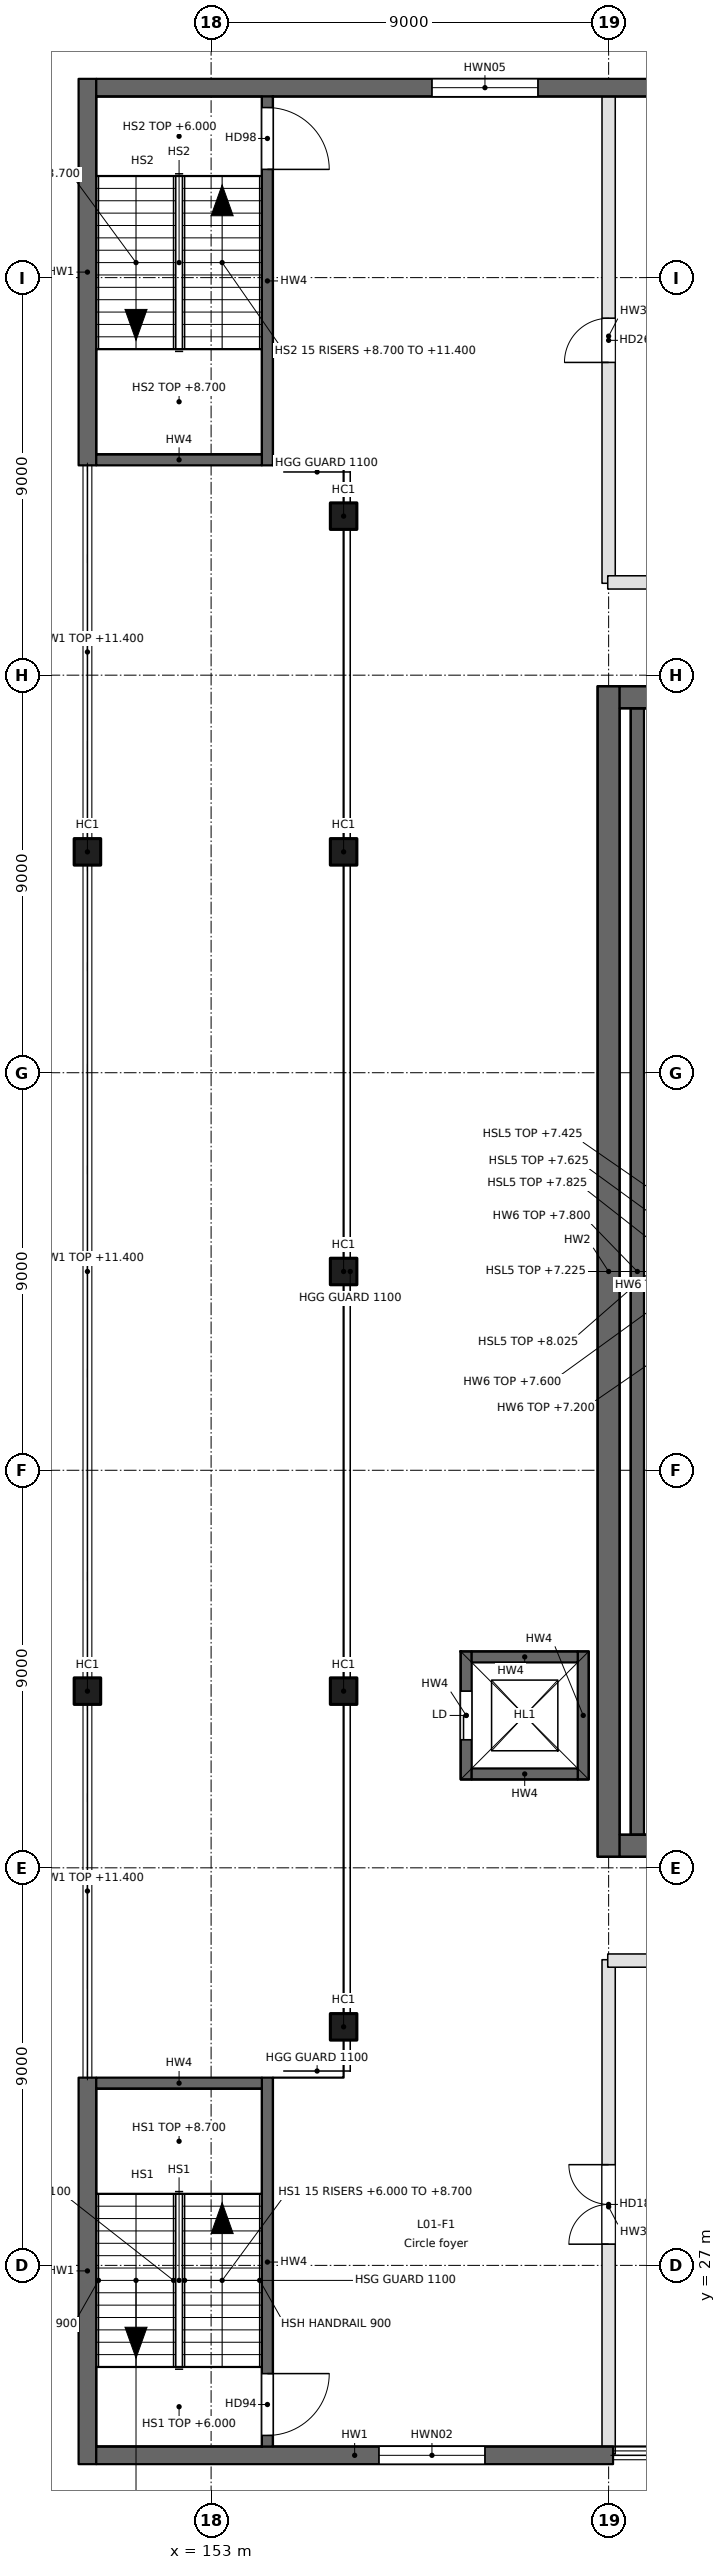
"""IFC4 building model, lengths in metres.
Left out: names, types, materials, properties, quantities, classifications, styles, units other than length and angle.
Written with IfcOpenShell. Run it as: python <this file> out.ifc"""

import sys

from ifc_helpers import new_model, si_unit, direction, frame, frame_2d, origin, origin_2d, place, context, subcontext, project, spatial, rectangle, extrude, element, fill, save


model = new_model("IFC4")
c1 = context("Model", 3, precision=1e-05, world=origin(), true_north=direction((0.0, 1.0)))
c2 = subcontext(c1, "Body", "Model", "MODEL_VIEW")
j1 = project(units=[si_unit("LENGTHUNIT", "METRE"), si_unit("PLANEANGLEUNIT", "RADIAN")], contexts=[c1])
p1 = place(None, origin())
s1 = spatial("IfcSite", under=j1, at=p1, CompositionType="ELEMENT")
p2 = place(p1, origin())
s2 = spatial("IfcBuilding", under=s1, at=p2, CompositionType="ELEMENT")
p3 = place(p2, frame((0.0, 0.0, 6.0)))
s3 = spatial("IfcBuildingStorey", under=s2, at=p3, CompositionType="ELEMENT", Elevation=6.0)
for number, where, z_axis, x_axis in (
    (1, (156.0, 32.4, 0.0), (0.0, 0.0, 1.0), (1.0, 0.0, 0.0)),
    (2, (156.0, 40.0, 0.0), (0.0, 0.0, 1.0), (1.0, 0.0, 0.0)),
    (3, (156.0, 49.5, 0.0), (0.0, 0.0, 1.0), (1.0, 0.0, 0.0)),
    (4, (156.0, 59.0, 0.0), (0.0, 0.0, 1.0), (1.0, 0.0, 0.0)),
    (5, (156.0, 66.6, 0.0), (0.0, 0.0, 1.0), (1.0, 0.0, 0.0)),
    (6, (150.2, 40.0, 0.0), (0.0, 0.0, 1.0), (1.0, 0.0, 0.0)),
    (7, (150.2, 59.0, 0.0), (0.0, 0.0, 1.0), (1.0, 0.0, 0.0)),
):
    element("IfcColumn", number, at=place(p3, frame(where, z_axis=z_axis, x_axis=x_axis)), inside=s3, PredefinedType="COLUMN", context=c2, shape_type="SweptSolid", body=[
        extrude(rectangle(XDim=0.6, YDim=0.6, at=origin_2d()), origin(), (0.0, 0.0, 1.0), 5.4),
    ])
p4 = place(p3, frame((162.0, 36.25, -0.35), z_axis=(0.0, 0.0, 1.0), x_axis=(0.0, 1.0, 0.0)))
e8 = element("IfcWall", 8, at=p4, inside=s3, PredefinedType="SOLIDWALL", context=c2, shape_type="SweptSolid", body=[
    extrude(rectangle(XDim=26.5, YDim=0.5, at=frame_2d((13.25, 0.0))), origin(), (0.0, 0.0, 1.0), 5.4),
])
p5 = place(p3, frame((209.6, 36.5, -0.35), z_axis=(0.0, 0.0, 1.0), x_axis=(-1.0, 0.0, 0.0)))
e9 = element("IfcWall", 9, at=p5, inside=s3, PredefinedType="SOLIDWALL", context=c2, shape_type="SweptSolid", body=[
    extrude(rectangle(XDim=47.35, YDim=0.5, at=frame_2d((23.675, 0.0))), origin(), (0.0, 0.0, 1.0), 5.4),
])
p6 = place(p5, frame((35.7, 0.0, 0.35)))
e10 = element("IfcOpeningElement", 10, at=p6, cuts=e9, PredefinedType="OPENING", context=c2, shape_type="SweptSolid", body=[
    extrude(rectangle(XDim=1.8, YDim=2.4, at=frame_2d((0.9, 1.2))), frame((0.0, 0.25, 0.0), z_axis=(0.0, -1.0, 0.0), x_axis=(1.0, 0.0, 0.0)), (0.0, 0.0, 1.0), 0.5),
])
p7 = place(p5, frame((33.3, 0.0, 0.35)))
e11 = element("IfcOpeningElement", 11, at=p7, cuts=e9, PredefinedType="OPENING", context=c2, shape_type="SweptSolid", body=[
    extrude(rectangle(XDim=1.8, YDim=2.4, at=frame_2d((0.9, 1.2))), frame((0.0, 0.25, 0.0), z_axis=(0.0, -1.0, 0.0), x_axis=(1.0, 0.0, 0.0)), (0.0, 0.0, 1.0), 0.5),
])
p8 = place(p3, frame((162.25, 62.5, -0.35), z_axis=(0.0, 0.0, 1.0), x_axis=(1.0, 0.0, 0.0)))
e12 = element("IfcWall", 12, at=p8, inside=s3, PredefinedType="SOLIDWALL", context=c2, shape_type="SweptSolid", body=[
    extrude(rectangle(XDim=47.35, YDim=0.5, at=frame_2d((23.675, 0.0))), origin(), (0.0, 0.0, 1.0), 5.4),
])
p9 = place(p8, frame((9.85, 0.0, 0.35)))
e13 = element("IfcOpeningElement", 13, at=p9, cuts=e12, PredefinedType="OPENING", context=c2, shape_type="SweptSolid", body=[
    extrude(rectangle(XDim=1.8, YDim=2.4, at=frame_2d((0.9, 1.2))), frame((0.0, 0.25, 0.0), z_axis=(0.0, -1.0, 0.0), x_axis=(1.0, 0.0, 0.0)), (0.0, 0.0, 1.0), 0.5),
])
p10 = place(p8, frame((12.25, 0.0, 0.35)))
e14 = element("IfcOpeningElement", 14, at=p10, cuts=e12, PredefinedType="OPENING", context=c2, shape_type="SweptSolid", body=[
    extrude(rectangle(XDim=1.8, YDim=2.4, at=frame_2d((0.9, 1.2))), frame((0.0, 0.25, 0.0), z_axis=(0.0, -1.0, 0.0), x_axis=(1.0, 0.0, 0.0)), (0.0, 0.0, 1.0), 0.5),
])
for number, where, z_axis, x_axis in (
    (15, (150.2, 22.5, -0.35), (0.0, 0.0, 1.0), (0.0, 1.0, 0.0)),
    (16, (150.2, 67.75, -0.35), (0.0, 0.0, 1.0), (0.0, 1.0, 0.0)),
):
    element("IfcWall", number, at=place(p3, frame(where, z_axis=z_axis, x_axis=x_axis)), inside=s3, PredefinedType="SOLIDWALL", context=c2, shape_type="SweptSolid", body=[
        extrude(rectangle(XDim=8.75, YDim=0.4, at=frame_2d((4.375, 0.0))), origin(), (0.0, 0.0, 1.0), 5.4),
    ])
p11 = place(p3, frame((162.1, 22.7, -0.35), z_axis=(0.0, 0.0, 1.0), x_axis=(-1.0, 0.0, 0.0)))
e17 = element("IfcWall", 17, at=p11, inside=s3, PredefinedType="SOLIDWALL", context=c2, shape_type="SweptSolid", body=[
    extrude(rectangle(XDim=11.7, YDim=0.4, at=frame_2d((5.85, 0.0))), origin(), (0.0, 0.0, 1.0), 5.4),
])
p12 = place(p11, frame((2.9, 0.0, 1.25)))
e18 = element("IfcOpeningElement", 18, at=p12, cuts=e17, PredefinedType="OPENING", context=c2, shape_type="SweptSolid", body=[
    extrude(rectangle(XDim=2.4, YDim=1.8, at=frame_2d((1.2, 0.9))), frame((0.0, 0.2, 0.0), z_axis=(0.0, -1.0, 0.0), x_axis=(1.0, 0.0, 0.0)), (0.0, 0.0, 1.0), 0.4),
])
p13 = place(p3, frame((150.4, 76.3, -0.35), z_axis=(0.0, 0.0, 1.0), x_axis=(1.0, 0.0, 0.0)))
e19 = element("IfcWall", 19, at=p13, inside=s3, PredefinedType="SOLIDWALL", context=c2, shape_type="SweptSolid", body=[
    extrude(rectangle(XDim=59.2, YDim=0.4, at=frame_2d((29.6, 0.0))), origin(), (0.0, 0.0, 1.0), 5.4),
])
p14 = place(p13, frame((7.6, 0.0, 1.25)))
e20 = element("IfcOpeningElement", 20, at=p14, cuts=e19, PredefinedType="OPENING", context=c2, shape_type="SweptSolid", body=[
    extrude(rectangle(XDim=2.4, YDim=1.8, at=frame_2d((1.2, 0.9))), frame((0.0, 0.2, 0.0), z_axis=(0.0, -1.0, 0.0), x_axis=(1.0, 0.0, 0.0)), (0.0, 0.0, 1.0), 0.4),
])
p15 = place(p13, frame((12.9, 0.0, 1.25)))
e21 = element("IfcOpeningElement", 21, at=p15, cuts=e19, PredefinedType="OPENING", context=c2, shape_type="SweptSolid", body=[
    extrude(rectangle(XDim=2.4, YDim=1.8, at=frame_2d((1.2, 0.9))), frame((0.0, 0.2, 0.0), z_axis=(0.0, -1.0, 0.0), x_axis=(1.0, 0.0, 0.0)), (0.0, 0.0, 1.0), 0.4),
])
p16 = place(p13, frame((19.4, 0.0, 1.25)))
e22 = element("IfcOpeningElement", 22, at=p16, cuts=e19, PredefinedType="OPENING", context=c2, shape_type="SweptSolid", body=[
    extrude(rectangle(XDim=2.4, YDim=1.8, at=frame_2d((1.2, 0.9))), frame((0.0, 0.2, 0.0), z_axis=(0.0, -1.0, 0.0), x_axis=(1.0, 0.0, 0.0)), (0.0, 0.0, 1.0), 0.4),
])
p17 = place(p13, frame((35.4, 0.0, 1.25)))
e23 = element("IfcOpeningElement", 23, at=p17, cuts=e19, PredefinedType="OPENING", context=c2, shape_type="SweptSolid", body=[
    extrude(rectangle(XDim=2.4, YDim=1.8, at=frame_2d((1.2, 0.9))), frame((0.0, 0.2, 0.0), z_axis=(0.0, -1.0, 0.0), x_axis=(1.0, 0.0, 0.0)), (0.0, 0.0, 1.0), 0.4),
])
p18 = place(p13, frame((52.28, 0.0, 1.25)))
e24 = element("IfcOpeningElement", 24, at=p18, cuts=e19, PredefinedType="OPENING", context=c2, shape_type="SweptSolid", body=[
    extrude(rectangle(XDim=2.4, YDim=1.8, at=frame_2d((1.2, 0.9))), frame((0.0, 0.2, 0.0), z_axis=(0.0, -1.0, 0.0), x_axis=(1.0, 0.0, 0.0)), (0.0, 0.0, 1.0), 0.4),
])
p19 = place(p3, frame((162.65, 36.75, 0.0), z_axis=(0.0, 0.0, 1.0), x_axis=(0.0, 1.0, 0.0)))
e25 = element("IfcWall", 25, at=p19, inside=s3, PredefinedType="SOLIDWALL", context=c2, shape_type="SweptSolid", body=[
    extrude(rectangle(XDim=25.5, YDim=0.3, at=frame_2d((12.75, 0.0))), origin(), (0.0, 0.0, 1.0), 1.8),
])
p20 = place(p3, frame((162.0, 22.73, 0.0), z_axis=(0.0, 0.0, 1.0), x_axis=(0.0, 1.0, 0.0)))
e26 = element("IfcWall", 26, at=p20, inside=s3, PredefinedType="PARTITIONING", context=c2, shape_type="SweptSolid", body=[
    extrude(rectangle(XDim=11.19, YDim=0.3, at=frame_2d((5.595, 0.0))), origin(), (0.0, 0.0, 1.0), 5.05),
])
p21 = place(p20, frame((4.75, 0.0, 0.0)))
e27 = element("IfcOpeningElement", 27, at=p21, cuts=e26, PredefinedType="OPENING", context=c2, shape_type="SweptSolid", body=[
    extrude(rectangle(XDim=1.8, YDim=2.1, at=frame_2d((0.9, 1.05))), frame((0.0, 0.15, 0.0), z_axis=(0.0, -1.0, 0.0), x_axis=(1.0, 0.0, 0.0)), (0.0, 0.0, 1.0), 0.3),
])
p22 = place(p3, frame((162.0, 65.08, 0.0), z_axis=(0.0, 0.0, 1.0), x_axis=(0.0, 1.0, 0.0)))
e28 = element("IfcWall", 28, at=p22, inside=s3, PredefinedType="PARTITIONING", context=c2, shape_type="SweptSolid", body=[
    extrude(rectangle(XDim=11.19, YDim=0.3, at=frame_2d((5.595, 0.0))), origin(), (0.0, 0.0, 1.0), 5.05),
])
p23 = place(p22, frame((5.0, 0.0, 0.0)))
e29 = element("IfcOpeningElement", 29, at=p23, cuts=e28, PredefinedType="OPENING", context=c2, shape_type="SweptSolid", body=[
    extrude(rectangle(XDim=1.0, YDim=2.1, at=frame_2d((0.5, 1.05))), frame((0.0, 0.15, 0.0), z_axis=(0.0, -1.0, 0.0), x_axis=(1.0, 0.0, 0.0)), (0.0, 0.0, 1.0), 0.3),
])
p24 = place(p3, frame((161.98, 33.9, 0.0), z_axis=(0.0, 0.0, 1.0), x_axis=(1.0, 0.0, 0.0)))
e30 = element("IfcWall", 30, at=p24, inside=s3, PredefinedType="PARTITIONING", context=c2, shape_type="SweptSolid", body=[
    extrude(rectangle(XDim=8.72, YDim=0.3, at=frame_2d((4.36, 0.0))), origin(), (0.0, 0.0, 1.0), 5.05),
])
p25 = place(p3, frame((170.7, 65.1, 0.0), z_axis=(0.0, 0.0, 1.0), x_axis=(-1.0, 0.0, 0.0)))
e31 = element("IfcWall", 31, at=p25, inside=s3, PredefinedType="PARTITIONING", context=c2, shape_type="SweptSolid", body=[
    extrude(rectangle(XDim=8.72, YDim=0.3, at=frame_2d((4.36, 0.0))), origin(), (0.0, 0.0, 1.0), 5.05),
])
p26 = place(p25, frame((0.92, 0.0, 0.0)))
e32 = element("IfcOpeningElement", 32, at=p26, cuts=e31, PredefinedType="OPENING", context=c2, shape_type="SweptSolid", body=[
    extrude(rectangle(XDim=1.8, YDim=2.1, at=frame_2d((0.9, 1.05))), frame((0.0, 0.15, 0.0), z_axis=(0.0, -1.0, 0.0), x_axis=(1.0, 0.0, 0.0)), (0.0, 0.0, 1.0), 0.3),
])
p27 = place(p3, frame((154.275, 31.25, -0.35), z_axis=(0.0, 0.0, 1.0), x_axis=(0.0, -1.0, 0.0)))
e33 = element("IfcWall", 33, at=p27, inside=s3, PredefinedType="SOLIDWALL", context=c2, shape_type="SweptSolid", body=[
    extrude(rectangle(XDim=8.35, YDim=0.25, at=frame_2d((4.175, 0.0))), origin(), (0.0, 0.0, 1.0), 5.4),
])
p28 = place(p27, frame((6.7, 0.0, 0.35)))
e34 = element("IfcOpeningElement", 34, at=p28, cuts=e33, PredefinedType="OPENING", context=c2, shape_type="SweptSolid", body=[
    extrude(rectangle(XDim=1.4, YDim=2.1, at=frame_2d((0.7, 1.05))), frame((0.0, 0.125, 0.0), z_axis=(0.0, -1.0, 0.0), x_axis=(1.0, 0.0, 0.0)), (0.0, 0.0, 1.0), 0.25),
])
p29 = place(p3, frame((150.4, 31.125, -0.35), z_axis=(0.0, 0.0, 1.0), x_axis=(1.0, 0.0, 0.0)))
e35 = element("IfcWall", 35, at=p29, inside=s3, PredefinedType="SOLIDWALL", context=c2, shape_type="SweptSolid", body=[
    extrude(rectangle(XDim=3.75, YDim=0.25, at=frame_2d((1.875, 0.0))), origin(), (0.0, 0.0, 1.0), 5.4),
])
p30 = place(p3, frame((154.275, 76.1, -0.35), z_axis=(0.0, 0.0, 1.0), x_axis=(0.0, -1.0, 0.0)))
e36 = element("IfcWall", 36, at=p30, inside=s3, PredefinedType="SOLIDWALL", context=c2, shape_type="SweptSolid", body=[
    extrude(rectangle(XDim=8.35, YDim=0.25, at=frame_2d((4.175, 0.0))), origin(), (0.0, 0.0, 1.0), 5.4),
])
p31 = place(p30, frame((0.25, 0.0, 0.35)))
e37 = element("IfcOpeningElement", 37, at=p31, cuts=e36, PredefinedType="OPENING", context=c2, shape_type="SweptSolid", body=[
    extrude(rectangle(XDim=1.4, YDim=2.1, at=frame_2d((0.7, 1.05))), frame((0.0, 0.125, 0.0), z_axis=(0.0, -1.0, 0.0), x_axis=(1.0, 0.0, 0.0)), (0.0, 0.0, 1.0), 0.25),
])
p32 = place(p3, frame((154.15, 67.875, -0.35), z_axis=(0.0, 0.0, 1.0), x_axis=(-1.0, 0.0, 0.0)))
e38 = element("IfcWall", 38, at=p32, inside=s3, PredefinedType="SOLIDWALL", context=c2, shape_type="SweptSolid", body=[
    extrude(rectangle(XDim=3.75, YDim=0.25, at=frame_2d((1.875, 0.0))), origin(), (0.0, 0.0, 1.0), 5.4),
])
p33 = place(p3, frame((158.775, 38.0, -0.35), z_axis=(0.0, 0.0, 1.0), x_axis=(0.0, 1.0, 0.0)))
e39 = element("IfcWall", 39, at=p33, inside=s3, PredefinedType="SOLIDWALL", context=c2, shape_type="SweptSolid", body=[
    extrude(rectangle(XDim=2.9, YDim=0.25, at=frame_2d((1.45, 0.0))), origin(), (0.0, 0.0, 1.0), 5.4),
])
p34 = place(p33, frame((0.9, 0.0, 0.35)))
e40 = element("IfcOpeningElement", 40, at=p34, cuts=e39, PredefinedType="OPENING", context=c2, shape_type="SweptSolid", body=[
    extrude(rectangle(XDim=1.1, YDim=2.1, at=frame_2d((0.55, 1.05))), frame((0.0, 0.125, 0.0), z_axis=(0.0, -1.0, 0.0), x_axis=(1.0, 0.0, 0.0)), (0.0, 0.0, 1.0), 0.25),
])
p35 = place(p3, frame((161.425, 40.9, -0.35), z_axis=(0.0, 0.0, 1.0), x_axis=(0.0, -1.0, 0.0)))
e41 = element("IfcWall", 41, at=p35, inside=s3, PredefinedType="SOLIDWALL", context=c2, shape_type="SweptSolid", body=[
    extrude(rectangle(XDim=2.9, YDim=0.25, at=frame_2d((1.45, 0.0))), origin(), (0.0, 0.0, 1.0), 5.4),
])
for number, where, z_axis, x_axis in (
    (42, (161.3, 38.125, -0.35), (0.0, 0.0, 1.0), (-1.0, 0.0, 0.0)),
    (43, (158.9, 40.775, -0.35), (0.0, 0.0, 1.0), (1.0, 0.0, 0.0)),
):
    element("IfcWall", number, at=place(p3, frame(where, z_axis=z_axis, x_axis=x_axis)), inside=s3, PredefinedType="SOLIDWALL", context=c2, shape_type="SweptSolid", body=[
        extrude(rectangle(XDim=2.4, YDim=0.25, at=frame_2d((1.2, 0.0))), origin(), (0.0, 0.0, 1.0), 5.4),
    ])
p36 = place(p21, origin())
e44 = element("IfcDoor", 44, at=p36, inside=s3, OperationType="DOUBLE_DOOR_SINGLE_SWING", PredefinedType="DOOR", context=c2, shape_type="SweptSolid", body=[
    extrude(rectangle(XDim=1.8, YDim=2.1, at=frame_2d((0.9, 1.05))), frame((0.0, 0.025, 0.0), z_axis=(0.0, -1.0, 0.0), x_axis=(1.0, 0.0, 0.0)), (0.0, 0.0, 1.0), 0.05),
])
fill(e27, e44)
p37 = place(p23, origin())
e45 = element("IfcDoor", 45, at=p37, inside=s3, OperationType="SINGLE_SWING_LEFT", PredefinedType="DOOR", context=c2, shape_type="SweptSolid", body=[
    extrude(rectangle(XDim=1.0, YDim=2.1, at=frame_2d((0.5, 1.05))), frame((0.0, 0.025, 0.0), z_axis=(0.0, -1.0, 0.0), x_axis=(1.0, 0.0, 0.0)), (0.0, 0.0, 1.0), 0.05),
])
fill(e29, e45)
p38 = place(p12, origin())
e46 = element("IfcWindow", 46, at=p38, inside=s3, PartitioningType="SINGLE_PANEL", PredefinedType="WINDOW", context=c2, shape_type="SweptSolid", body=[
    extrude(rectangle(XDim=2.4, YDim=1.8, at=frame_2d((1.2, 0.9))), frame((0.0, 0.03, 0.0), z_axis=(0.0, -1.0, 0.0), x_axis=(1.0, 0.0, 0.0)), (0.0, 0.0, 1.0), 0.06),
])
fill(e18, e46)
p39 = place(p14, origin())
e47 = element("IfcWindow", 47, at=p39, inside=s3, PartitioningType="SINGLE_PANEL", PredefinedType="WINDOW", context=c2, shape_type="SweptSolid", body=[
    extrude(rectangle(XDim=2.4, YDim=1.8, at=frame_2d((1.2, 0.9))), frame((0.0, 0.03, 0.0), z_axis=(0.0, -1.0, 0.0), x_axis=(1.0, 0.0, 0.0)), (0.0, 0.0, 1.0), 0.06),
])
fill(e20, e47)
p40 = place(p28, origin())
e48 = element("IfcDoor", 48, at=p40, inside=s3, OperationType="SINGLE_SWING_LEFT", PredefinedType="DOOR", context=c2, shape_type="SweptSolid", body=[
    extrude(rectangle(XDim=1.4, YDim=2.1, at=frame_2d((0.7, 1.05))), frame((0.0, 0.025, 0.0), z_axis=(0.0, -1.0, 0.0), x_axis=(1.0, 0.0, 0.0)), (0.0, 0.0, 1.0), 0.05),
])
fill(e34, e48)
p41 = place(p31, origin())
e49 = element("IfcDoor", 49, at=p41, inside=s3, OperationType="SINGLE_SWING_RIGHT", PredefinedType="DOOR", context=c2, shape_type="SweptSolid", body=[
    extrude(rectangle(XDim=1.4, YDim=2.1, at=frame_2d((0.7, 1.05))), frame((0.0, 0.025, 0.0), z_axis=(0.0, -1.0, 0.0), x_axis=(1.0, 0.0, 0.0)), (0.0, 0.0, 1.0), 0.05),
])
fill(e37, e49)
p42 = place(p34, origin())
e50 = element("IfcDoor", 50, at=p42, inside=s3, OperationType="SLIDING_TO_LEFT", PredefinedType="DOOR", context=c2, shape_type="SweptSolid", body=[
    extrude(rectangle(XDim=1.1, YDim=2.1, at=frame_2d((0.55, 1.05))), frame((0.0, 0.025, 0.0), z_axis=(0.0, -1.0, 0.0), x_axis=(1.0, 0.0, 0.0)), (0.0, 0.0, 1.0), 0.05),
])
fill(e40, e50)
save(model, sys.argv[1])
